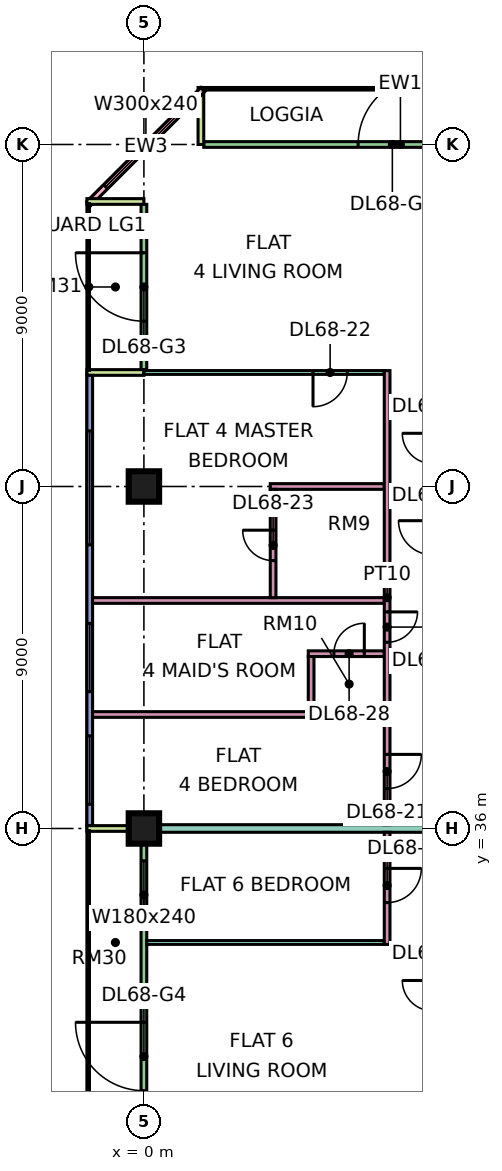
"""IFC4 building model, lengths in metres.
Left out: names, types, materials, properties, quantities, classifications, styles, units other than length and angle.
Written with IfcOpenShell. Run it as: python <this file> out.ifc"""

import sys

from ifc_helpers import new_model, si_unit, direction, frame, frame_2d, origin, origin_2d, place, context, subcontext, project, spatial, rectangle, extrude, element, fill, save


model = new_model("IFC4")
c1 = context("Model", 3, precision=1e-05, world=origin(), true_north=direction((0.0, 1.0)))
c2 = subcontext(c1, "Body", "Model", "MODEL_VIEW")
j1 = project(units=[si_unit("LENGTHUNIT", "METRE"), si_unit("PLANEANGLEUNIT", "RADIAN")], contexts=[c1])
p1 = place(None, origin())
s1 = spatial("IfcSite", under=j1, at=p1, CompositionType="ELEMENT")
p2 = place(p1, origin())
s2 = spatial("IfcBuilding", under=s1, at=p2, CompositionType="ELEMENT")
p3 = place(p2, frame((0.0, 0.0, 292.15)))
s3 = spatial("IfcBuildingStorey", under=s2, at=p3, CompositionType="ELEMENT", Elevation=292.15)
p4 = place(p3, frame((0.0, 36.0, 0.0), z_axis=(0.0, 0.0, 1.0), x_axis=(1.0, 0.0, 0.0)))
e1 = element("IfcColumn", 1, at=p4, inside=s3, PredefinedType="COLUMN", context=c2, shape_type="SweptSolid", body=[
    extrude(rectangle(XDim=0.8, YDim=0.8, at=origin_2d()), origin(), (0.0, 0.0, 1.0), 3.75),
])
p5 = place(p3, frame((0.0, 45.0, 0.0), z_axis=(0.0, 0.0, 1.0), x_axis=(1.0, 0.0, 0.0)))
e2 = element("IfcColumn", 2, at=p5, inside=s3, PredefinedType="COLUMN", context=c2, shape_type="SweptSolid", body=[
    extrude(rectangle(XDim=0.8, YDim=0.8, at=origin_2d()), origin(), (0.0, 0.0, 1.0), 3.75),
])
p6 = place(p3, frame((11.925, 54.0, 0.0), z_axis=(0.0, 0.0, 1.0), x_axis=(-1.0, 0.0, 0.0)))
e3 = element("IfcWall", 3, at=p6, inside=s3, PredefinedType="SOLIDWALL", context=c2, shape_type="SweptSolid", body=[
    extrude(rectangle(XDim=10.35, YDim=0.15, at=frame_2d((5.175, 0.0))), origin(), (0.0, 0.0, 1.0), 3.35),
])
p7 = place(p6, frame((4.488, 0.0, 0.0)))
e4 = element("IfcOpeningElement", 4, at=p7, cuts=e3, PredefinedType="OPENING", context=c2, shape_type="SweptSolid", body=[
    extrude(rectangle(XDim=1.8, YDim=2.4, at=frame_2d((0.9, 1.2))), frame((0.0, 0.085, 0.0), z_axis=(0.0, -1.0, 0.0), x_axis=(1.0, 0.0, 0.0)), (0.0, 0.0, 1.0), 0.17),
])
p8 = place(p3, frame((1.5, 55.5, 0.0), z_axis=(0.0, 0.0, 1.0), x_axis=(0.0, -1.0, 0.0)))
e5 = element("IfcWall", 5, at=p8, inside=s3, PredefinedType="SOLIDWALL", context=c2, shape_type="SweptSolid", body=[
    extrude(rectangle(XDim=1.5, YDim=0.15, at=frame_2d((0.75, 0.0))), origin(), (0.0, 0.0, 1.0), 3.35),
])
p9 = place(p3, frame((1.553, 55.447, 0.0), z_axis=(0.0, 0.0, 1.0), x_axis=(-0.707106781187, -0.707106781187, 0.0)))
e6 = element("IfcWall", 6, at=p9, inside=s3, PredefinedType="SOLIDWALL", context=c2, shape_type="SweptSolid", body=[
    extrude(rectangle(XDim=4.243, YDim=0.15, at=frame_2d((2.121, 0.0))), origin(), (0.0, 0.0, 1.0), 3.35),
])
p10 = place(p9, frame((0.621, 0.0, 0.45)))
e7 = element("IfcOpeningElement", 7, at=p10, cuts=e6, PredefinedType="OPENING", context=c2, shape_type="SweptSolid", body=[
    extrude(rectangle(XDim=3.0, YDim=2.4, at=frame_2d((1.5, 1.2))), frame((0.0, 0.085, 0.0), z_axis=(0.0, -1.0, 0.0), x_axis=(1.0, 0.0, 0.0)), (0.0, 0.0, 1.0), 0.17),
])
p11 = place(p3, frame((0.0, 52.425, 0.0), z_axis=(0.0, 0.0, 1.0), x_axis=(0.0, -1.0, 0.0)))
e8 = element("IfcWall", 8, at=p11, inside=s3, PredefinedType="SOLIDWALL", context=c2, shape_type="SweptSolid", body=[
    extrude(rectangle(XDim=4.35, YDim=0.15, at=frame_2d((2.175, 0.0))), origin(), (0.0, 0.0, 1.0), 3.35),
])
p12 = place(p11, frame((1.275, 0.0, 0.0)))
e9 = element("IfcOpeningElement", 9, at=p12, cuts=e8, PredefinedType="OPENING", context=c2, shape_type="SweptSolid", body=[
    extrude(rectangle(XDim=1.8, YDim=2.4, at=frame_2d((0.9, 1.2))), frame((0.0, 0.085, 0.0), z_axis=(0.0, -1.0, 0.0), x_axis=(1.0, 0.0, 0.0)), (0.0, 0.0, 1.0), 0.17),
])
for number, where, z_axis, x_axis in (
    (10, (-1.5, 52.5, 0.0), (0.0, 0.0, 1.0), (1.0, 0.0, 0.0)),
    (11, (-1.5, 48.0, 0.0), (0.0, 0.0, 1.0), (1.0, 0.0, 0.0)),
):
    element("IfcWall", number, at=place(p3, frame(where, z_axis=z_axis, x_axis=x_axis)), inside=s3, PredefinedType="SOLIDWALL", context=c2, shape_type="SweptSolid", body=[
        extrude(rectangle(XDim=1.5, YDim=0.15, at=frame_2d((0.75, 0.0))), origin(), (0.0, 0.0, 1.0), 3.35),
    ])
p13 = place(p3, frame((-1.425, 47.925, 0.0), z_axis=(0.0, 0.0, 1.0), x_axis=(0.0, -1.0, 0.0)))
e12 = element("IfcWall", 12, at=p13, inside=s3, PredefinedType="SOLIDWALL", context=c2, shape_type="SweptSolid", body=[
    extrude(rectangle(XDim=11.85, YDim=0.15, at=frame_2d((5.925, 0.0))), origin(), (0.0, 0.0, 1.0), 3.35),
])
p14 = place(p13, frame((1.462, 0.0, 0.45)))
e13 = element("IfcOpeningElement", 13, at=p14, cuts=e12, PredefinedType="OPENING", context=c2, shape_type="SweptSolid", body=[
    extrude(rectangle(XDim=3.0, YDim=2.4, at=frame_2d((1.5, 1.2))), frame((0.0, 0.085, 0.0), z_axis=(0.0, -1.0, 0.0), x_axis=(1.0, 0.0, 0.0)), (0.0, 0.0, 1.0), 0.17),
])
p15 = place(p13, frame((6.525, 0.0, 0.45)))
e14 = element("IfcOpeningElement", 14, at=p15, cuts=e12, PredefinedType="OPENING", context=c2, shape_type="SweptSolid", body=[
    extrude(rectangle(XDim=1.8, YDim=2.4, at=frame_2d((0.9, 1.2))), frame((0.0, 0.085, 0.0), z_axis=(0.0, -1.0, 0.0), x_axis=(1.0, 0.0, 0.0)), (0.0, 0.0, 1.0), 0.17),
])
p16 = place(p13, frame((9.488, 0.0, 0.45)))
e15 = element("IfcOpeningElement", 15, at=p16, cuts=e12, PredefinedType="OPENING", context=c2, shape_type="SweptSolid", body=[
    extrude(rectangle(XDim=1.8, YDim=2.4, at=frame_2d((0.9, 1.2))), frame((0.0, 0.085, 0.0), z_axis=(0.0, -1.0, 0.0), x_axis=(1.0, 0.0, 0.0)), (0.0, 0.0, 1.0), 0.17),
])
p17 = place(p3, frame((0.0, 35.925, 0.0), z_axis=(0.0, 0.0, 1.0), x_axis=(0.0, -1.0, 0.0)))
e16 = element("IfcWall", 16, at=p17, inside=s3, PredefinedType="SOLIDWALL", context=c2, shape_type="SweptSolid", body=[
    extrude(rectangle(XDim=11.85, YDim=0.15, at=frame_2d((5.925, 0.0))), origin(), (0.0, 0.0, 1.0), 3.35),
])
p18 = place(p17, frame((0.775, 0.0, 0.45)))
e17 = element("IfcOpeningElement", 17, at=p18, cuts=e16, PredefinedType="OPENING", context=c2, shape_type="SweptSolid", body=[
    extrude(rectangle(XDim=1.8, YDim=2.4, at=frame_2d((0.9, 1.2))), frame((0.0, 0.085, 0.0), z_axis=(0.0, -1.0, 0.0), x_axis=(1.0, 0.0, 0.0)), (0.0, 0.0, 1.0), 0.17),
])
p19 = place(p17, frame((5.025, 0.0, 0.0)))
e18 = element("IfcOpeningElement", 18, at=p19, cuts=e16, PredefinedType="OPENING", context=c2, shape_type="SweptSolid", body=[
    extrude(rectangle(XDim=1.8, YDim=2.4, at=frame_2d((0.9, 1.2))), frame((0.0, 0.085, 0.0), z_axis=(0.0, -1.0, 0.0), x_axis=(1.0, 0.0, 0.0)), (0.0, 0.0, 1.0), 0.17),
])
p20 = place(p17, frame((9.275, 0.0, 0.45)))
e19 = element("IfcOpeningElement", 19, at=p20, cuts=e16, PredefinedType="OPENING", context=c2, shape_type="SweptSolid", body=[
    extrude(rectangle(XDim=1.8, YDim=2.4, at=frame_2d((0.9, 1.2))), frame((0.0, 0.085, 0.0), z_axis=(0.0, -1.0, 0.0), x_axis=(1.0, 0.0, 0.0)), (0.0, 0.0, 1.0), 0.17),
])
p21 = place(p3, frame((-1.5, 36.0, 0.0), z_axis=(0.0, 0.0, 1.0), x_axis=(1.0, 0.0, 0.0)))
e20 = element("IfcWall", 20, at=p21, inside=s3, PredefinedType="SOLIDWALL", context=c2, shape_type="SweptSolid", body=[
    extrude(rectangle(XDim=1.5, YDim=0.15, at=frame_2d((0.75, 0.0))), origin(), (0.0, 0.0, 1.0), 3.35),
])
for number, where, z_axis, x_axis in (
    (21, (-1.351, 39.0, 0.0), (0.0, 0.0, 1.0), (1.0, 0.0, 0.0)),
    (22, (-1.351, 42.0, 0.0), (0.0, 0.0, 1.0), (1.0, 0.0, 0.0)),
):
    element("IfcWall", number, at=place(p3, frame(where, z_axis=z_axis, x_axis=x_axis)), inside=s3, PredefinedType="PARTITIONING", context=c2, shape_type="SweptSolid", body=[
        extrude(rectangle(XDim=7.676, YDim=0.15, at=frame_2d((3.838, 0.0))), origin(), (0.0, 0.0, 1.0), 3.35),
    ])
e23 = element("IfcWall", 23, at=p4, inside=s3, PredefinedType="PARTITIONING", context=c2, shape_type="SweptSolid", body=[
    extrude(rectangle(XDim=12.3, YDim=0.2, at=frame_2d((6.15, 0.0))), origin(), (0.0, 0.0, 1.0), 3.35),
])
p22 = place(p3, frame((0.0, 48.0, 0.0), z_axis=(0.0, 0.0, 1.0), x_axis=(1.0, 0.0, 0.0)))
e24 = element("IfcWall", 24, at=p22, inside=s3, PredefinedType="PARTITIONING", context=c2, shape_type="SweptSolid", body=[
    extrude(rectangle(XDim=6.325, YDim=0.1, at=frame_2d((3.163, 0.0))), origin(), (0.0, 0.0, 1.0), 3.35),
])
p23 = place(p22, frame((4.45, 0.0, 0.0)))
e25 = element("IfcOpeningElement", 25, at=p23, cuts=e24, PredefinedType="OPENING", context=c2, shape_type="SweptSolid", body=[
    extrude(rectangle(XDim=0.9, YDim=2.1, at=frame_2d((0.45, 1.05))), frame((0.0, 0.06, 0.0), z_axis=(0.0, -1.0, 0.0), x_axis=(1.0, 0.0, 0.0)), (0.0, 0.0, 1.0), 0.12),
])
p24 = place(p3, frame((0.074, 33.0, 0.0), z_axis=(0.0, 0.0, 1.0), x_axis=(1.0, 0.0, 0.0)))
e26 = element("IfcWall", 26, at=p24, inside=s3, PredefinedType="PARTITIONING", context=c2, shape_type="SweptSolid", body=[
    extrude(rectangle(XDim=6.251, YDim=0.1, at=frame_2d((3.125, 0.0))), origin(), (0.0, 0.0, 1.0), 3.35),
])
p25 = place(p3, frame((3.325, 45.0, 0.0), z_axis=(0.0, 0.0, 1.0), x_axis=(1.0, 0.0, 0.0)))
e27 = element("IfcWall", 27, at=p25, inside=s3, PredefinedType="PARTITIONING", context=c2, shape_type="SweptSolid", body=[
    extrude(rectangle(XDim=3.0, YDim=0.15, at=frame_2d((1.5, 0.0))), origin(), (0.0, 0.0, 1.0), 3.35),
])
p26 = place(p3, frame((3.4, 42.075, 0.0), z_axis=(0.0, 0.0, 1.0), x_axis=(0.0, 1.0, 0.0)))
e28 = element("IfcWall", 28, at=p26, inside=s3, PredefinedType="PARTITIONING", context=c2, shape_type="SweptSolid", body=[
    extrude(rectangle(XDim=2.85, YDim=0.15, at=frame_2d((1.425, 0.0))), origin(), (0.0, 0.0, 1.0), 3.35),
])
p27 = place(p26, frame((0.975, 0.0, 0.0)))
e29 = element("IfcOpeningElement", 29, at=p27, cuts=e28, PredefinedType="OPENING", context=c2, shape_type="SweptSolid", body=[
    extrude(rectangle(XDim=0.8, YDim=2.1, at=frame_2d((0.4, 1.05))), frame((0.0, 0.085, 0.0), z_axis=(0.0, -1.0, 0.0), x_axis=(1.0, 0.0, 0.0)), (0.0, 0.0, 1.0), 0.17),
])
p28 = place(p3, frame((4.325, 40.6, 0.0), z_axis=(0.0, 0.0, 1.0), x_axis=(1.0, 0.0, 0.0)))
e30 = element("IfcWall", 30, at=p28, inside=s3, PredefinedType="PARTITIONING", context=c2, shape_type="SweptSolid", body=[
    extrude(rectangle(XDim=2.0, YDim=0.15, at=frame_2d((1.0, 0.0))), origin(), (0.0, 0.0, 1.0), 3.35),
])
p29 = place(p28, frame((0.675, 0.0, 0.0)))
e31 = element("IfcOpeningElement", 31, at=p29, cuts=e30, PredefinedType="OPENING", context=c2, shape_type="SweptSolid", body=[
    extrude(rectangle(XDim=0.8, YDim=2.1, at=frame_2d((0.4, 1.05))), frame((0.0, 0.085, 0.0), z_axis=(0.0, -1.0, 0.0), x_axis=(1.0, 0.0, 0.0)), (0.0, 0.0, 1.0), 0.17),
])
p30 = place(p3, frame((4.4, 39.075, 0.0), z_axis=(0.0, 0.0, 1.0), x_axis=(0.0, 1.0, 0.0)))
e32 = element("IfcWall", 32, at=p30, inside=s3, PredefinedType="PARTITIONING", context=c2, shape_type="SweptSolid", body=[
    extrude(rectangle(XDim=1.45, YDim=0.15, at=frame_2d((0.725, 0.0))), origin(), (0.0, 0.0, 1.0), 3.35),
])
p31 = place(p3, frame((6.4, 32.95, 0.0), z_axis=(0.0, 0.0, 1.0), x_axis=(0.0, 1.0, 0.0)))
e33 = element("IfcWall", 33, at=p31, inside=s3, PredefinedType="PARTITIONING", context=c2, shape_type="SweptSolid", body=[
    extrude(rectangle(XDim=2.95, YDim=0.15, at=frame_2d((1.475, 0.0))), origin(), (0.0, 0.0, 1.0), 3.35),
])
p32 = place(p31, frame((1.1, 0.0, 0.0)))
e34 = element("IfcOpeningElement", 34, at=p32, cuts=e33, PredefinedType="OPENING", context=c2, shape_type="SweptSolid", body=[
    extrude(rectangle(XDim=0.9, YDim=2.1, at=frame_2d((0.45, 1.05))), frame((0.0, 0.085, 0.0), z_axis=(0.0, -1.0, 0.0), x_axis=(1.0, 0.0, 0.0)), (0.0, 0.0, 1.0), 0.17),
])
p33 = place(p3, frame((6.4, 36.1, 0.0), z_axis=(0.0, 0.0, 1.0), x_axis=(0.0, 1.0, 0.0)))
e35 = element("IfcWall", 35, at=p33, inside=s3, PredefinedType="PARTITIONING", context=c2, shape_type="SweptSolid", body=[
    extrude(rectangle(XDim=11.95, YDim=0.15, at=frame_2d((5.975, 0.0))), origin(), (0.0, 0.0, 1.0), 3.35),
])
p34 = place(p33, frame((0.95, 0.0, 0.0)))
e36 = element("IfcOpeningElement", 36, at=p34, cuts=e35, PredefinedType="OPENING", context=c2, shape_type="SweptSolid", body=[
    extrude(rectangle(XDim=0.9, YDim=2.1, at=frame_2d((0.45, 1.05))), frame((0.0, 0.085, 0.0), z_axis=(0.0, -1.0, 0.0), x_axis=(1.0, 0.0, 0.0)), (0.0, 0.0, 1.0), 0.17),
])
p35 = place(p33, frame((4.8, 0.0, 0.0)))
e37 = element("IfcOpeningElement", 37, at=p35, cuts=e35, PredefinedType="OPENING", context=c2, shape_type="SweptSolid", body=[
    extrude(rectangle(XDim=0.8, YDim=2.1, at=frame_2d((0.4, 1.05))), frame((0.0, 0.085, 0.0), z_axis=(0.0, -1.0, 0.0), x_axis=(1.0, 0.0, 0.0)), (0.0, 0.0, 1.0), 0.17),
])
p36 = place(p7, frame((1.8, 0.0, 0.0), z_axis=(0.0, 0.0, 1.0), x_axis=(-1.0, 0.0, 0.0)))
e38 = element("IfcDoor", 38, at=p36, inside=s3, OperationType="DOUBLE_DOOR_SINGLE_SWING", PredefinedType="DOOR", context=c2, shape_type="SweptSolid", body=[
    extrude(rectangle(XDim=1.8, YDim=2.4, at=frame_2d((0.9, 1.2))), frame((0.0, 0.025, 0.0), z_axis=(0.0, -1.0, 0.0), x_axis=(1.0, 0.0, 0.0)), (0.0, 0.0, 1.0), 0.05),
])
fill(e4, e38)
p37 = place(p10, origin())
e39 = element("IfcWindow", 39, at=p37, inside=s3, PartitioningType="SINGLE_PANEL", PredefinedType="WINDOW", context=c2, shape_type="SweptSolid", body=[
    extrude(rectangle(XDim=3.0, YDim=2.4, at=frame_2d((1.5, 1.2))), frame((0.0, 0.03, 0.0), z_axis=(0.0, -1.0, 0.0), x_axis=(1.0, 0.0, 0.0)), (0.0, 0.0, 1.0), 0.06),
])
fill(e7, e39)
p38 = place(p12, frame((1.8, 0.0, 0.0), z_axis=(0.0, 0.0, 1.0), x_axis=(-1.0, 0.0, 0.0)))
e40 = element("IfcDoor", 40, at=p38, inside=s3, OperationType="DOUBLE_DOOR_SINGLE_SWING", PredefinedType="DOOR", context=c2, shape_type="SweptSolid", body=[
    extrude(rectangle(XDim=1.8, YDim=2.4, at=frame_2d((0.9, 1.2))), frame((0.0, 0.025, 0.0), z_axis=(0.0, -1.0, 0.0), x_axis=(1.0, 0.0, 0.0)), (0.0, 0.0, 1.0), 0.05),
])
fill(e9, e40)
p39 = place(p14, origin())
e41 = element("IfcWindow", 41, at=p39, inside=s3, PartitioningType="SINGLE_PANEL", PredefinedType="WINDOW", context=c2, shape_type="SweptSolid", body=[
    extrude(rectangle(XDim=3.0, YDim=2.4, at=frame_2d((1.5, 1.2))), frame((0.0, 0.03, 0.0), z_axis=(0.0, -1.0, 0.0), x_axis=(1.0, 0.0, 0.0)), (0.0, 0.0, 1.0), 0.06),
])
fill(e13, e41)
p40 = place(p15, origin())
e42 = element("IfcWindow", 42, at=p40, inside=s3, PartitioningType="SINGLE_PANEL", PredefinedType="WINDOW", context=c2, shape_type="SweptSolid", body=[
    extrude(rectangle(XDim=1.8, YDim=2.4, at=frame_2d((0.9, 1.2))), frame((0.0, 0.03, 0.0), z_axis=(0.0, -1.0, 0.0), x_axis=(1.0, 0.0, 0.0)), (0.0, 0.0, 1.0), 0.06),
])
fill(e14, e42)
p41 = place(p16, origin())
e43 = element("IfcWindow", 43, at=p41, inside=s3, PartitioningType="SINGLE_PANEL", PredefinedType="WINDOW", context=c2, shape_type="SweptSolid", body=[
    extrude(rectangle(XDim=1.8, YDim=2.4, at=frame_2d((0.9, 1.2))), frame((0.0, 0.03, 0.0), z_axis=(0.0, -1.0, 0.0), x_axis=(1.0, 0.0, 0.0)), (0.0, 0.0, 1.0), 0.06),
])
fill(e15, e43)
p42 = place(p18, origin())
e44 = element("IfcWindow", 44, at=p42, inside=s3, PartitioningType="SINGLE_PANEL", PredefinedType="WINDOW", context=c2, shape_type="SweptSolid", body=[
    extrude(rectangle(XDim=1.8, YDim=2.4, at=frame_2d((0.9, 1.2))), frame((0.0, 0.03, 0.0), z_axis=(0.0, -1.0, 0.0), x_axis=(1.0, 0.0, 0.0)), (0.0, 0.0, 1.0), 0.06),
])
fill(e17, e44)
p43 = place(p19, frame((1.8, 0.0, 0.0), z_axis=(0.0, 0.0, 1.0), x_axis=(-1.0, 0.0, 0.0)))
e45 = element("IfcDoor", 45, at=p43, inside=s3, OperationType="DOUBLE_DOOR_SINGLE_SWING", PredefinedType="DOOR", context=c2, shape_type="SweptSolid", body=[
    extrude(rectangle(XDim=1.8, YDim=2.4, at=frame_2d((0.9, 1.2))), frame((0.0, 0.025, 0.0), z_axis=(0.0, -1.0, 0.0), x_axis=(1.0, 0.0, 0.0)), (0.0, 0.0, 1.0), 0.05),
])
fill(e18, e45)
p44 = place(p34, origin())
e46 = element("IfcDoor", 46, at=p44, inside=s3, OperationType="SINGLE_SWING_RIGHT", PredefinedType="DOOR", context=c2, shape_type="SweptSolid", body=[
    extrude(rectangle(XDim=0.9, YDim=2.1, at=frame_2d((0.45, 1.05))), frame((0.0, 0.025, 0.0), z_axis=(0.0, -1.0, 0.0), x_axis=(1.0, 0.0, 0.0)), (0.0, 0.0, 1.0), 0.05),
])
fill(e36, e46)
p45 = place(p23, frame((0.9, 0.0, 0.0), z_axis=(0.0, 0.0, 1.0), x_axis=(-1.0, 0.0, 0.0)))
e47 = element("IfcDoor", 47, at=p45, inside=s3, OperationType="SINGLE_SWING_LEFT", PredefinedType="DOOR", context=c2, shape_type="SweptSolid", body=[
    extrude(rectangle(XDim=0.9, YDim=2.1, at=frame_2d((0.45, 1.05))), frame((0.0, 0.025, 0.0), z_axis=(0.0, -1.0, 0.0), x_axis=(1.0, 0.0, 0.0)), (0.0, 0.0, 1.0), 0.05),
])
fill(e25, e47)
p46 = place(p27, frame((0.8, 0.0, 0.0), z_axis=(0.0, 0.0, 1.0), x_axis=(-1.0, 0.0, 0.0)))
e48 = element("IfcDoor", 48, at=p46, inside=s3, OperationType="SINGLE_SWING_RIGHT", PredefinedType="DOOR", context=c2, shape_type="SweptSolid", body=[
    extrude(rectangle(XDim=0.8, YDim=2.1, at=frame_2d((0.4, 1.05))), frame((0.0, 0.025, 0.0), z_axis=(0.0, -1.0, 0.0), x_axis=(1.0, 0.0, 0.0)), (0.0, 0.0, 1.0), 0.05),
])
fill(e29, e48)
p47 = place(p35, origin())
e49 = element("IfcDoor", 49, at=p47, inside=s3, OperationType="SINGLE_SWING_RIGHT", PredefinedType="DOOR", context=c2, shape_type="SweptSolid", body=[
    extrude(rectangle(XDim=0.8, YDim=2.1, at=frame_2d((0.4, 1.05))), frame((0.0, 0.025, 0.0), z_axis=(0.0, -1.0, 0.0), x_axis=(1.0, 0.0, 0.0)), (0.0, 0.0, 1.0), 0.05),
])
fill(e37, e49)
p48 = place(p29, frame((0.8, 0.0, 0.0), z_axis=(0.0, 0.0, 1.0), x_axis=(-1.0, 0.0, 0.0)))
e50 = element("IfcDoor", 50, at=p48, inside=s3, OperationType="SINGLE_SWING_RIGHT", PredefinedType="DOOR", context=c2, shape_type="SweptSolid", body=[
    extrude(rectangle(XDim=0.8, YDim=2.1, at=frame_2d((0.4, 1.05))), frame((0.0, 0.025, 0.0), z_axis=(0.0, -1.0, 0.0), x_axis=(1.0, 0.0, 0.0)), (0.0, 0.0, 1.0), 0.05),
])
fill(e31, e50)
p49 = place(p32, origin())
e51 = element("IfcDoor", 51, at=p49, inside=s3, OperationType="SINGLE_SWING_RIGHT", PredefinedType="DOOR", context=c2, shape_type="SweptSolid", body=[
    extrude(rectangle(XDim=0.9, YDim=2.1, at=frame_2d((0.45, 1.05))), frame((0.0, 0.025, 0.0), z_axis=(0.0, -1.0, 0.0), x_axis=(1.0, 0.0, 0.0)), (0.0, 0.0, 1.0), 0.05),
])
fill(e34, e51)
save(model, sys.argv[1])
